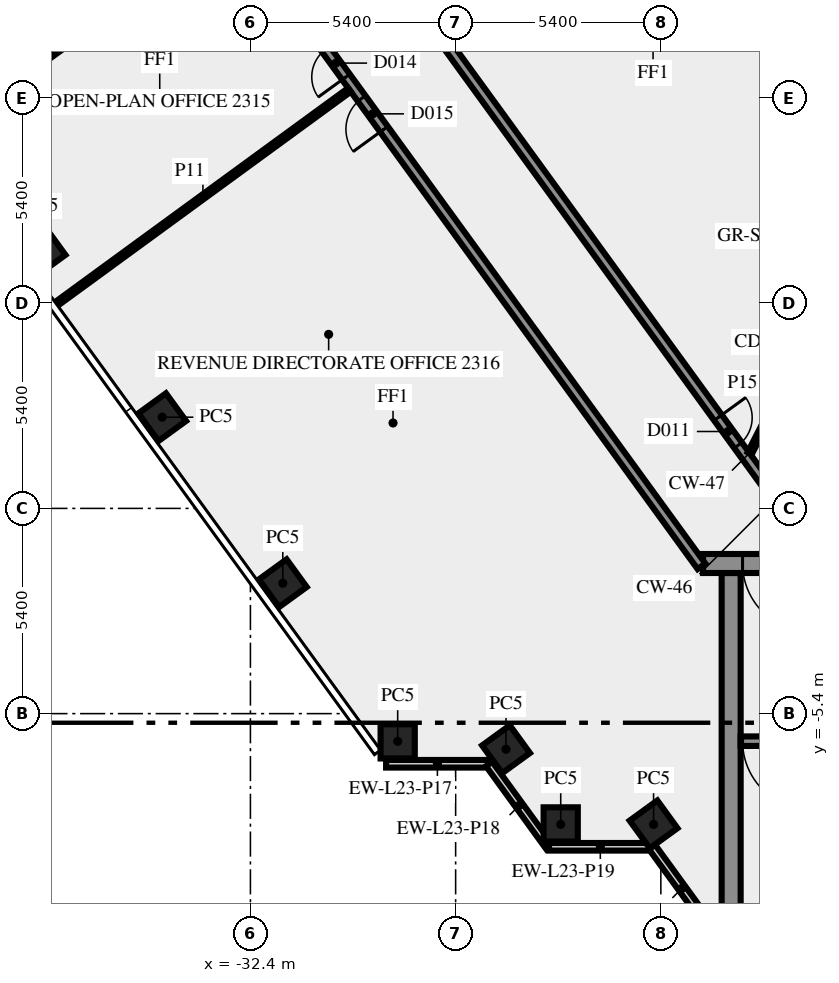
"""IFC4 building model, lengths in metres.
Left out: names, types, materials, properties, quantities, classifications, styles, units other than length and angle.
Written with IfcOpenShell. Run it as: python <this file> out.ifc"""

import sys

from ifc_helpers import new_model, si_unit, direction, frame, frame_2d, origin, origin_2d, place, context, subcontext, project, spatial, rectangle, extrude, element, fill, save


model = new_model("IFC4")
c1 = context("Model", 3, precision=1e-05, world=origin(), true_north=direction((0.0, 1.0)))
c2 = subcontext(c1, "Body", "Model", "MODEL_VIEW")
j1 = project(units=[si_unit("LENGTHUNIT", "METRE"), si_unit("PLANEANGLEUNIT", "RADIAN")], contexts=[c1])
p1 = place(None, origin())
s1 = spatial("IfcSite", under=j1, at=p1, CompositionType="ELEMENT")
p2 = place(p1, origin())
s2 = spatial("IfcBuilding", under=s1, at=p2, CompositionType="ELEMENT")
p3 = place(p2, frame((0.0, 0.0, 101.0)))
s3 = spatial("IfcBuildingStorey", under=s2, at=p3, CompositionType="ELEMENT", Elevation=101.0)
for number, where, z_axis, x_axis in (
    (1, (-37.896, 6.769, 0.0), (0.0, 0.0, 1.0), (0.588, -0.809, 0.0)),
    (2, (-34.722, 2.4, 0.0), (0.0, 0.0, 1.0), (0.588, -0.809, 0.0)),
    (3, (-31.548, -1.969, 0.0), (0.0, 0.0, 1.0), (0.588, -0.809, 0.0)),
    (4, (-28.525, -6.13, 0.0), (0.0, 0.0, 1.0), (1.0, 0.0, 0.0)),
    (5, (-25.674, -6.337, 0.0), (0.0, 0.0, 1.0), (0.588, -0.809, 0.0)),
    (6, (-24.235, -8.315, 0.0), (0.0, 0.0, 1.0), (1.0, 0.0, 0.0)),
    (7, (-21.792, -8.315, 0.0), (0.0, 0.0, 1.0), (0.588, -0.809, 0.0)),
):
    element("IfcColumn", number, at=place(p3, frame(where, z_axis=z_axis, x_axis=x_axis)), inside=s3, PredefinedType="COLUMN", context=c2, shape_type="SweptSolid", body=[
        extrude(rectangle(XDim=0.9, YDim=0.9, at=origin_2d()), origin(), (0.0, 0.0, 1.0), 3.65),
    ])
p4 = place(p3, frame((-28.83, -6.719, 0.0), z_axis=(0.0, 0.0, 1.0), x_axis=(1.0, 0.0, 0.0)))
e8 = element("IfcWall", 8, at=p4, inside=s3, PredefinedType="SOLIDWALL", context=c2, shape_type="SweptSolid", body=[
    extrude(rectangle(XDim=2.7, YDim=0.2, at=frame_2d((1.35, 0.0))), origin(), (0.0, 0.0, 1.0), 3.65),
])
p5 = place(p3, frame((-26.12, -6.724, 0.0), z_axis=(0.0, 0.0, 1.0), x_axis=(0.587720002413, -0.809064397168, 0.0)))
e9 = element("IfcWall", 9, at=p5, inside=s3, PredefinedType="SOLIDWALL", context=c2, shape_type="SweptSolid", body=[
    extrude(rectangle(XDim=2.7, YDim=0.2, at=frame_2d((1.35, 0.0))), origin(), (0.0, 0.0, 1.0), 3.65),
])
p6 = place(p3, frame((-24.543, -8.904, 0.0), z_axis=(0.0, 0.0, 1.0), x_axis=(1.0, 0.0, 0.0)))
e10 = element("IfcWall", 10, at=p6, inside=s3, PredefinedType="SOLIDWALL", context=c2, shape_type="SweptSolid", body=[
    extrude(rectangle(XDim=2.7, YDim=0.2, at=frame_2d((1.35, 0.0))), origin(), (0.0, 0.0, 1.0), 3.65),
])
p7 = place(p3, frame((-21.833, -8.909, 0.0), z_axis=(0.0, 0.0, 1.0), x_axis=(0.587766567315, -0.809030569476, 0.0)))
e11 = element("IfcWall", 11, at=p7, inside=s3, PredefinedType="SOLIDWALL", context=c2, shape_type="SweptSolid", body=[
    extrude(rectangle(XDim=2.688, YDim=0.2, at=frame_2d((1.344, 0.0))), origin(), (0.0, 0.0, 1.0), 3.65),
])
p8 = place(p3, frame((-19.75, -10.5, 0.0), z_axis=(0.0, 0.0, 1.0), x_axis=(0.0, 1.0, 0.0)))
e12 = element("IfcWall", 12, at=p8, inside=s3, PredefinedType="SHEAR", context=c2, shape_type="SweptSolid", body=[
    extrude(rectangle(XDim=8.8, YDim=0.5, at=frame_2d((4.4, 0.0))), origin(), (0.0, 0.0, 1.0), 3.65),
])
p9 = place(p3, frame((-11.45, -6.125, 0.0), z_axis=(0.0, 0.0, 1.0), x_axis=(-1.0, 0.0, 0.0)))
e13 = element("IfcWall", 13, at=p9, inside=s3, PredefinedType="SHEAR", context=c2, shape_type="SweptSolid", body=[
    extrude(rectangle(XDim=8.05, YDim=0.25, at=frame_2d((4.025, 0.0))), origin(), (0.0, 0.0, 1.0), 3.65),
])
p10 = place(p9, frame((6.2, 0.0, 0.0)))
e14 = element("IfcOpeningElement", 14, at=p10, cuts=e13, PredefinedType="OPENING", context=c2, shape_type="SweptSolid", body=[
    extrude(rectangle(XDim=1.8, YDim=2.1, at=frame_2d((0.9, 1.05))), frame((0.0, 0.135, 0.0), z_axis=(0.0, -1.0, 0.0), x_axis=(1.0, 0.0, 0.0)), (0.0, 0.0, 1.0), 0.27),
])
p11 = place(p3, frame((20.49, -1.45, 0.0), z_axis=(0.0, 0.0, 1.0), x_axis=(-1.0, 0.0, 0.0)))
e15 = element("IfcWall", 15, at=p11, inside=s3, PredefinedType="SHEAR", context=c2, shape_type="SweptSolid", body=[
    extrude(rectangle(XDim=40.98, YDim=0.5, at=frame_2d((20.49, 0.0))), origin(), (0.0, 0.0, 1.0), 3.65),
])
p12 = place(p11, frame((38.14, 0.0, 0.0)))
e16 = element("IfcOpeningElement", 16, at=p12, cuts=e15, PredefinedType="OPENING", context=c2, shape_type="SweptSolid", body=[
    extrude(rectangle(XDim=1.8, YDim=2.1, at=frame_2d((0.9, 1.05))), frame((0.0, 0.26, 0.0), z_axis=(0.0, -1.0, 0.0), x_axis=(1.0, 0.0, 0.0)), (0.0, 0.0, 1.0), 0.52),
])
p13 = place(p11, frame((36.728, 0.0, 0.0)))
e17 = element("IfcOpeningElement", 17, at=p13, cuts=e15, PredefinedType="OPENING", context=c2, shape_type="SweptSolid", body=[
    extrude(rectangle(XDim=0.8, YDim=2.1, at=frame_2d((0.4, 1.05))), frame((0.0, 0.26, 0.0), z_axis=(0.0, -1.0, 0.0), x_axis=(1.0, 0.0, 0.0)), (0.0, 0.0, 1.0), 0.52),
])
p14 = place(p11, frame((35.153, 0.0, 0.0)))
e18 = element("IfcOpeningElement", 18, at=p14, cuts=e15, PredefinedType="OPENING", context=c2, shape_type="SweptSolid", body=[
    extrude(rectangle(XDim=0.8, YDim=2.1, at=frame_2d((0.4, 1.05))), frame((0.0, 0.26, 0.0), z_axis=(0.0, -1.0, 0.0), x_axis=(1.0, 0.0, 0.0)), (0.0, 0.0, 1.0), 0.52),
])
p15 = place(p11, frame((32.94, 0.0, 0.0)))
e19 = element("IfcOpeningElement", 19, at=p15, cuts=e15, PredefinedType="OPENING", context=c2, shape_type="SweptSolid", body=[
    extrude(rectangle(XDim=0.9, YDim=2.1, at=frame_2d((0.45, 1.05))), frame((0.0, 0.26, 0.0), z_axis=(0.0, -1.0, 0.0), x_axis=(1.0, 0.0, 0.0)), (0.0, 0.0, 1.0), 0.52),
])
p16 = place(p11, frame((19.59, 0.0, 0.0)))
e20 = element("IfcOpeningElement", 20, at=p16, cuts=e15, PredefinedType="OPENING", context=c2, shape_type="SweptSolid", body=[
    extrude(rectangle(XDim=2.0, YDim=2.1, at=frame_2d((1.0, 1.05))), frame((0.0, 0.26, 0.0), z_axis=(0.0, -1.0, 0.0), x_axis=(1.0, 0.0, 0.0)), (0.0, 0.0, 1.0), 0.52),
])
p17 = place(p11, frame((7.14, 0.0, 0.0)))
e21 = element("IfcOpeningElement", 21, at=p17, cuts=e15, PredefinedType="OPENING", context=c2, shape_type="SweptSolid", body=[
    extrude(rectangle(XDim=0.9, YDim=2.1, at=frame_2d((0.45, 1.05))), frame((0.0, 0.26, 0.0), z_axis=(0.0, -1.0, 0.0), x_axis=(1.0, 0.0, 0.0)), (0.0, 0.0, 1.0), 0.52),
])
p18 = place(p11, frame((4.19, 0.0, 0.0)))
e22 = element("IfcOpeningElement", 22, at=p18, cuts=e15, PredefinedType="OPENING", context=c2, shape_type="SweptSolid", body=[
    extrude(rectangle(XDim=0.9, YDim=2.1, at=frame_2d((0.45, 1.05))), frame((0.0, 0.26, 0.0), z_axis=(0.0, -1.0, 0.0), x_axis=(1.0, 0.0, 0.0)), (0.0, 0.0, 1.0), 0.52),
])
p19 = place(p11, frame((1.04, 0.0, 0.0)))
e23 = element("IfcOpeningElement", 23, at=p19, cuts=e15, PredefinedType="OPENING", context=c2, shape_type="SweptSolid", body=[
    extrude(rectangle(XDim=1.8, YDim=2.1, at=frame_2d((0.9, 1.05))), frame((0.0, 0.26, 0.0), z_axis=(0.0, -1.0, 0.0), x_axis=(1.0, 0.0, 0.0)), (0.0, 0.0, 1.0), 0.52),
])
p20 = place(p3, frame((-20.531, -1.523, 0.0), z_axis=(0.0, 0.0, 1.0), x_axis=(-0.587784593204, 0.809017473231, 0.0)))
e24 = element("IfcWall", 24, at=p20, inside=s3, PredefinedType="SOLIDWALL", context=c2, shape_type="SweptSolid", body=[
    extrude(rectangle(XDim=44.67, YDim=0.25, at=frame_2d((22.335, 0.0))), origin(), (0.0, 0.0, 1.0), 3.65),
])
p21 = place(p20, frame((43.296, 0.0, 0.0)))
e25 = element("IfcOpeningElement", 25, at=p21, cuts=e24, PredefinedType="OPENING", context=c2, shape_type="SweptSolid", body=[
    extrude(rectangle(XDim=0.9, YDim=2.1, at=frame_2d((0.45, 1.05))), frame((0.0, 0.135, 0.0), z_axis=(0.0, -1.0, 0.0), x_axis=(1.0, 0.0, 0.0)), (0.0, 0.0, 1.0), 0.27),
])
p22 = place(p20, frame((15.916, 0.0, 0.0)))
e26 = element("IfcOpeningElement", 26, at=p22, cuts=e24, PredefinedType="OPENING", context=c2, shape_type="SweptSolid", body=[
    extrude(rectangle(XDim=0.9, YDim=2.1, at=frame_2d((0.45, 1.05))), frame((0.0, 0.135, 0.0), z_axis=(0.0, -1.0, 0.0), x_axis=(1.0, 0.0, 0.0)), (0.0, 0.0, 1.0), 0.27),
])
p23 = place(p20, frame((33.116, 0.0, 0.0)))
e27 = element("IfcOpeningElement", 27, at=p23, cuts=e24, PredefinedType="OPENING", context=c2, shape_type="SweptSolid", body=[
    extrude(rectangle(XDim=1.0, YDim=2.1, at=frame_2d((0.5, 1.05))), frame((0.0, 0.135, 0.0), z_axis=(0.0, -1.0, 0.0), x_axis=(1.0, 0.0, 0.0)), (0.0, 0.0, 1.0), 0.27),
])
p24 = place(p20, frame((14.216, 0.0, 0.0)))
e28 = element("IfcOpeningElement", 28, at=p24, cuts=e24, PredefinedType="OPENING", context=c2, shape_type="SweptSolid", body=[
    extrude(rectangle(XDim=1.0, YDim=2.1, at=frame_2d((0.5, 1.05))), frame((0.0, 0.135, 0.0), z_axis=(0.0, -1.0, 0.0), x_axis=(1.0, 0.0, 0.0)), (0.0, 0.0, 1.0), 0.27),
])
p25 = place(p3, frame((-37.232, 25.972, 0.0), z_axis=(0.0, 0.0, 1.0), x_axis=(0.587786323093, -0.809016216391, 0.0)))
e29 = element("IfcWall", 29, at=p25, inside=s3, PredefinedType="SOLIDWALL", context=c2, shape_type="SweptSolid", body=[
    extrude(rectangle(XDim=33.493, YDim=0.25, at=frame_2d((16.747, 0.0))), origin(), (0.0, 0.0, 1.0), 3.65),
])
p26 = place(p25, frame((13.185, 0.0, 0.0)))
e30 = element("IfcOpeningElement", 30, at=p26, cuts=e29, PredefinedType="OPENING", context=c2, shape_type="SweptSolid", body=[
    extrude(rectangle(XDim=1.2, YDim=2.1, at=frame_2d((0.6, 1.05))), frame((0.0, 0.135, 0.0), z_axis=(0.0, -1.0, 0.0), x_axis=(1.0, 0.0, 0.0)), (0.0, 0.0, 1.0), 0.27),
])
p27 = place(p25, frame((29.152, 0.0, 0.0)))
e31 = element("IfcOpeningElement", 31, at=p27, cuts=e29, PredefinedType="OPENING", context=c2, shape_type="SweptSolid", body=[
    extrude(rectangle(XDim=0.9, YDim=2.1, at=frame_2d((0.45, 1.05))), frame((0.0, 0.135, 0.0), z_axis=(0.0, -1.0, 0.0), x_axis=(1.0, 0.0, 0.0)), (0.0, 0.0, 1.0), 0.27),
])
p28 = place(p3, frame((-32.943, 15.349, 0.0), z_axis=(0.0, 0.0, 1.0), x_axis=(-0.80903787798, -0.587756507402, 0.0)))
e32 = element("IfcWall", 32, at=p28, inside=s3, PredefinedType="PARTITIONING", context=c2, shape_type="SweptSolid", body=[
    extrude(rectangle(XDim=9.652, YDim=0.12, at=frame_2d((4.826, 0.0))), origin(), (0.0, 0.0, 1.0), 2.75),
])
p29 = place(p3, frame((-37.506, 5.381, 0.0), z_axis=(0.0, 0.0, 1.0), x_axis=(0.807645841498, 0.589667868135, 0.0)))
e33 = element("IfcWall", 33, at=p29, inside=s3, PredefinedType="PARTITIONING", context=c2, shape_type="SweptSolid", body=[
    extrude(rectangle(XDim=9.551, YDim=0.12, at=frame_2d((4.775, 0.0))), origin(), (0.0, 0.0, 1.0), 2.75),
])
p30 = place(p3, frame((-19.261, 1.45, 0.0), z_axis=(0.0, 0.0, 1.0), x_axis=(0.453950796792, 0.891026752736, 0.0)))
e34 = element("IfcWall", 34, at=p30, inside=s3, PredefinedType="PARTITIONING", context=c2, shape_type="SweptSolid", body=[
    extrude(rectangle(XDim=2.778, YDim=0.12, at=frame_2d((1.389, 0.0))), origin(), (0.0, 0.0, 1.0), 3.65),
])
p31 = place(p10, origin())
e35 = element("IfcDoor", 35, at=p31, inside=s3, OperationType="DOUBLE_DOOR_SINGLE_SWING", PredefinedType="DOOR", context=c2, shape_type="SweptSolid", body=[
    extrude(rectangle(XDim=1.8, YDim=2.1, at=frame_2d((0.9, 1.05))), frame((0.0, 0.025, 0.0), z_axis=(0.0, -1.0, 0.0), x_axis=(1.0, 0.0, 0.0)), (0.0, 0.0, 1.0), 0.05),
])
fill(e14, e35)
p32 = place(p12, origin())
e36 = element("IfcDoor", 36, at=p32, inside=s3, OperationType="DOUBLE_DOOR_SINGLE_SWING", PredefinedType="DOOR", context=c2, shape_type="SweptSolid", body=[
    extrude(rectangle(XDim=1.8, YDim=2.1, at=frame_2d((0.9, 1.05))), frame((0.0, 0.025, 0.0), z_axis=(0.0, -1.0, 0.0), x_axis=(1.0, 0.0, 0.0)), (0.0, 0.0, 1.0), 0.05),
])
fill(e16, e36)
p33 = place(p22, origin())
e37 = element("IfcDoor", 37, at=p33, inside=s3, OperationType="SINGLE_SWING_LEFT", PredefinedType="DOOR", context=c2, shape_type="SweptSolid", body=[
    extrude(rectangle(XDim=0.9, YDim=2.1, at=frame_2d((0.45, 1.05))), frame((0.0, 0.025, 0.0), z_axis=(0.0, -1.0, 0.0), x_axis=(1.0, 0.0, 0.0)), (0.0, 0.0, 1.0), 0.05),
])
fill(e26, e37)
p34 = place(p24, origin())
e38 = element("IfcDoor", 38, at=p34, inside=s3, OperationType="SINGLE_SWING_RIGHT", PredefinedType="DOOR", context=c2, shape_type="SweptSolid", body=[
    extrude(rectangle(XDim=1.0, YDim=2.1, at=frame_2d((0.5, 1.05))), frame((0.0, 0.025, 0.0), z_axis=(0.0, -1.0, 0.0), x_axis=(1.0, 0.0, 0.0)), (0.0, 0.0, 1.0), 0.05),
])
fill(e28, e38)
p35 = place(p27, origin())
e39 = element("IfcDoor", 39, at=p35, inside=s3, OperationType="SINGLE_SWING_RIGHT", PredefinedType="DOOR", context=c2, shape_type="SweptSolid", body=[
    extrude(rectangle(XDim=0.9, YDim=2.1, at=frame_2d((0.45, 1.05))), frame((0.0, 0.025, 0.0), z_axis=(0.0, -1.0, 0.0), x_axis=(1.0, 0.0, 0.0)), (0.0, 0.0, 1.0), 0.05),
])
fill(e31, e39)
save(model, sys.argv[1])
